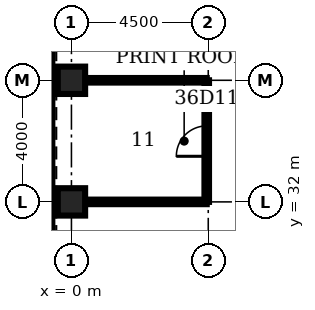
"""IFC4 building model, lengths in metres.
Left out: names, types, materials, properties, quantities, classifications, styles, units other than length and angle.
Written with IfcOpenShell. Run it as: python <this file> out.ifc"""

import sys

from ifc_helpers import new_model, si_unit, direction, frame, frame_2d, origin, origin_2d, place, context, subcontext, project, spatial, rectangle, hollow_rectangle, extrude, element, fill, save


model = new_model("IFC4")
c1 = context("Model", 3, precision=1e-05, world=origin(), true_north=direction((0.0, 1.0)))
c2 = subcontext(c1, "Body", "Model", "MODEL_VIEW")
j1 = project(units=[si_unit("LENGTHUNIT", "METRE"), si_unit("PLANEANGLEUNIT", "RADIAN")], contexts=[c1])
p1 = place(None, origin())
s1 = spatial("IfcSite", under=j1, at=p1, CompositionType="ELEMENT")
p2 = place(p1, origin())
s2 = spatial("IfcBuilding", under=s1, at=p2, CompositionType="ELEMENT")
p3 = place(p2, frame((0.0, 0.0, 163.5)))
s3 = spatial("IfcBuildingStorey", under=s2, at=p3, CompositionType="ELEMENT", Elevation=163.5)
for number, where, z_axis, x_axis in (
    (1, (0.0, 36.0, 0.0), (0.0, 0.0, 1.0), (1.0, 0.0, 0.0)),
    (2, (0.0, 32.0, 0.0), (0.0, 0.0, 1.0), (1.0, 0.0, 0.0)),
):
    element("IfcColumn", number, at=place(p3, frame(where, z_axis=z_axis, x_axis=x_axis)), inside=s3, PredefinedType="COLUMN", context=c2, shape_type="SweptSolid", body=[
        extrude(hollow_rectangle(XDim=0.9, YDim=0.9, WallThickness=0.09, at=origin_2d()), origin(), (0.0, 0.0, 1.0), 4.2),
    ])
for number, where, z_axis, x_axis in (
    (3, (0.45, 32.0, 0.0), (0.0, 0.0, 1.0), (1.0, 0.0, 0.0)),
    (4, (0.45, 36.0, 0.0), (0.0, 0.0, 1.0), (1.0, 0.0, 0.0)),
):
    element("IfcWall", number, at=place(p3, frame(where, z_axis=z_axis, x_axis=x_axis)), inside=s3, PredefinedType="PARTITIONING", context=c2, shape_type="SweptSolid", body=[
        extrude(rectangle(XDim=4.0, YDim=0.15, at=frame_2d((2.0, 0.0))), origin(), (0.0, 0.0, 1.0), 3.0),
    ])
p4 = place(p3, frame((4.45, 32.0, 0.0), z_axis=(0.0, 0.0, 1.0), x_axis=(0.0, 1.0, 0.0)))
e5 = element("IfcWall", 5, at=p4, inside=s3, PredefinedType="PARTITIONING", context=c2, shape_type="SweptSolid", body=[
    extrude(rectangle(XDim=4.0, YDim=0.15, at=frame_2d((2.0, 0.0))), origin(), (0.0, 0.0, 1.0), 3.0),
])
p5 = place(p4, frame((1.5, 0.0, 0.0)))
e6 = element("IfcOpeningElement", 6, at=p5, cuts=e5, PredefinedType="OPENING", context=c2, shape_type="SweptSolid", body=[
    extrude(rectangle(XDim=1.0, YDim=2.1, at=frame_2d((0.5, 1.05))), frame((0.0, 0.085, 0.0), z_axis=(0.0, -1.0, 0.0), x_axis=(1.0, 0.0, 0.0)), (0.0, 0.0, 1.0), 0.17),
])
p6 = place(p5, origin())
e7 = element("IfcDoor", 7, at=p6, inside=s3, OperationType="SINGLE_SWING_LEFT", PredefinedType="DOOR", context=c2, shape_type="SweptSolid", body=[
    extrude(rectangle(XDim=1.0, YDim=2.1, at=frame_2d((0.5, 1.05))), frame((0.0, 0.025, 0.0), z_axis=(0.0, -1.0, 0.0), x_axis=(1.0, 0.0, 0.0)), (0.0, 0.0, 1.0), 0.05),
])
fill(e6, e7)
save(model, sys.argv[1])
